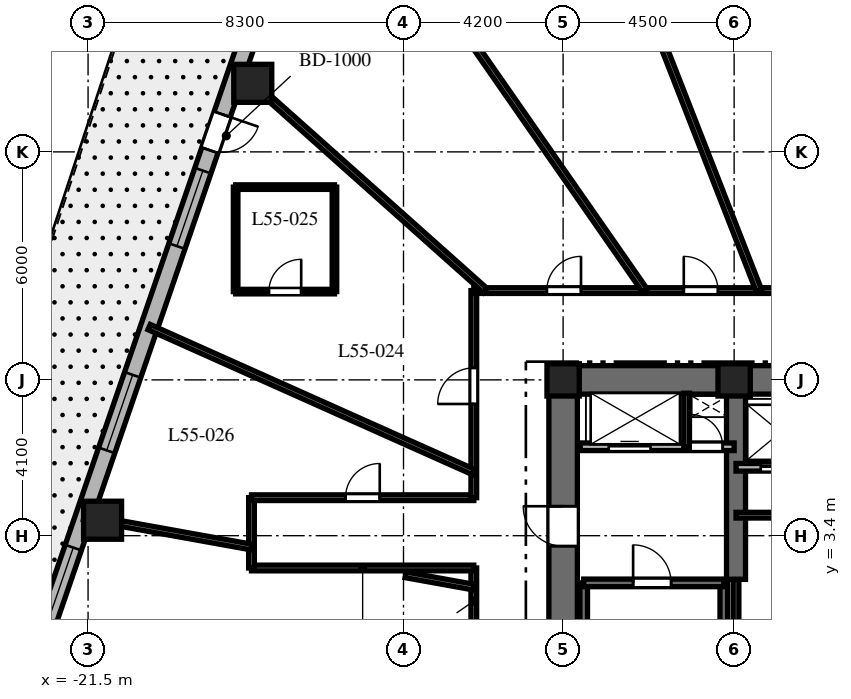
"""IFC4 building model, lengths in metres.
Left out: names, types, materials, properties, quantities, classifications, styles, units other than length and angle.
Written with IfcOpenShell. Run it as: python <this file> out.ifc"""

import sys

from ifc_helpers import new_model, si_unit, direction, frame, frame_2d, origin, origin_2d, place, context, subcontext, project, spatial, rectangle, extrude, element, fill, save


model = new_model("IFC4")
c1 = context("Model", 3, precision=1e-05, world=origin(), true_north=direction((0.0, 1.0)))
c2 = subcontext(c1, "Body", "Model", "MODEL_VIEW")
j1 = project(units=[si_unit("LENGTHUNIT", "METRE"), si_unit("PLANEANGLEUNIT", "RADIAN")], contexts=[c1])
p1 = place(None, origin())
s1 = spatial("IfcSite", under=j1, at=p1, CompositionType="ELEMENT")
p2 = place(p1, origin())
s2 = spatial("IfcBuilding", under=s1, at=p2, CompositionType="ELEMENT")
p3 = place(p2, frame((0.0, 0.0, 221.7)))
s3 = spatial("IfcBuildingStorey", under=s2, at=p3, CompositionType="ELEMENT", Elevation=221.7)
p4 = place(p3, frame((-9.375, 7.5, 0.0), z_axis=(0.0, 0.0, 1.0), x_axis=(1.0, 0.0, 0.0)))
e1 = element("IfcWall", 1, at=p4, inside=s3, PredefinedType="SHEAR", context=c2, shape_type="SweptSolid", body=[
    extrude(rectangle(XDim=9.425, YDim=0.75, at=frame_2d((4.712, 0.0))), origin(), (0.0, 0.0, 1.0), 3.8),
])
p5 = place(p3, frame((-9.0, -7.125, 0.0), z_axis=(0.0, 0.0, 1.0), x_axis=(0.0, 1.0, 0.0)))
e2 = element("IfcWall", 2, at=p5, inside=s3, PredefinedType="SHEAR", context=c2, shape_type="SweptSolid", body=[
    extrude(rectangle(XDim=14.25, YDim=0.75, at=frame_2d((7.125, 0.0))), origin(), (0.0, 0.0, 1.0), 3.8),
])
p6 = place(p5, frame((10.25, 0.0, 0.0)))
e3 = element("IfcOpeningElement", 3, at=p6, cuts=e2, PredefinedType="OPENING", context=c2, shape_type="SweptSolid", body=[
    extrude(rectangle(XDim=1.05, YDim=2.15, at=frame_2d((0.525, 1.075))), frame((0.0, 0.385, 0.0), z_axis=(0.0, -1.0, 0.0), x_axis=(1.0, 0.0, 0.0)), (0.0, 0.0, 1.0), 0.77),
])
p7 = place(p3, frame((-4.45, 2.25, 0.0), z_axis=(0.0, 0.0, 1.0), x_axis=(0.0, 1.0, 0.0)))
e4 = element("IfcWall", 4, at=p7, inside=s3, PredefinedType="SHEAR", context=c2, shape_type="SweptSolid", body=[
    extrude(rectangle(XDim=4.875, YDim=0.5, at=frame_2d((2.438, 0.0))), origin(), (0.0, 0.0, 1.0), 3.8),
])
for number, where, z_axis, x_axis in (
    (5, (-8.458, -6.985, 0.0), (0.0, 0.0, 1.0), (0.0, 1.0, 0.0)),
    (6, (-4.772, -6.985, 0.0), (0.0, 0.0, 1.0), (0.0, 1.0, 0.0)),
):
    element("IfcWall", number, at=place(p3, frame(where, z_axis=z_axis, x_axis=x_axis)), inside=s3, PredefinedType="SHEAR", context=c2, shape_type="SweptSolid", body=[
        extrude(rectangle(XDim=9.143, YDim=0.2, at=frame_2d((4.572, 0.0))), origin(), (0.0, 0.0, 1.0), 3.8),
    ])
p8 = place(p3, frame((-8.458, 2.158, 0.0), z_axis=(0.0, 0.0, 1.0), x_axis=(1.0, 0.0, 0.0)))
e7 = element("IfcWall", 7, at=p8, inside=s3, PredefinedType="SHEAR", context=c2, shape_type="SweptSolid", body=[
    extrude(rectangle(XDim=3.686, YDim=0.2, at=frame_2d((1.843, 0.0))), origin(), (0.0, 0.0, 1.0), 3.8),
])
p9 = place(p8, frame((1.3, 0.0, 0.0)))
e8 = element("IfcOpeningElement", 8, at=p9, cuts=e7, PredefinedType="OPENING", context=c2, shape_type="SweptSolid", body=[
    extrude(rectangle(XDim=1.0, YDim=2.15, at=frame_2d((0.5, 1.075))), frame((0.0, 0.11, 0.0), z_axis=(0.0, -1.0, 0.0), x_axis=(1.0, 0.0, 0.0)), (0.0, 0.0, 1.0), 0.22),
])
for number, where, z_axis, x_axis in (
    (9, (-4.5, 7.5, 0.0), (0.0, 0.0, 1.0), (1.0, 0.0, 0.0)),
    (10, (-9.0, 7.5, 0.0), (0.0, 0.0, 1.0), (1.0, 0.0, 0.0)),
):
    element("IfcColumn", number, at=place(p3, frame(where, z_axis=z_axis, x_axis=x_axis)), inside=s3, PredefinedType="COLUMN", context=c2, shape_type="SweptSolid", body=[
        extrude(rectangle(XDim=0.85, YDim=0.85, at=origin_2d()), origin(), (0.0, 0.0, 1.0), 3.8),
    ])
for number, where, z_axis, x_axis in (
    (11, (-17.166, 15.304, 0.0), (0.0, 0.0, 1.0), (1.0, 0.0, 0.0)),
    (12, (-21.118, 3.807, 0.0), (0.0, 0.0, 1.0), (1.0, 0.0, 0.0)),
):
    element("IfcColumn", number, at=place(p3, frame(where, z_axis=z_axis, x_axis=x_axis)), inside=s3, PredefinedType="COLUMN", context=c2, shape_type="SweptSolid", body=[
        extrude(rectangle(XDim=1.0, YDim=1.0, at=origin_2d()), origin(), (0.0, 0.0, 1.0), 3.8),
    ])
p10 = place(p3, frame((-16.324, 19.275, 0.0), z_axis=(0.0, 0.0, 1.0), x_axis=(-0.325083142304, -0.945685439557, 0.0)))
e13 = element("IfcWall", 13, at=p10, inside=s3, PredefinedType="SOLIDWALL", context=c2, shape_type="SweptSolid", body=[
    extrude(rectangle(XDim=20.224, YDim=0.45, at=frame_2d((10.112, 0.0))), origin(), (0.0, 0.0, 1.0), 3.5),
])
p11 = place(p10, frame((5.062, 0.0, 0.0)))
e14 = element("IfcOpeningElement", 14, at=p11, cuts=e13, PredefinedType="OPENING", context=c2, shape_type="SweptSolid", body=[
    extrude(rectangle(XDim=1.0, YDim=2.15, at=frame_2d((0.5, 1.075))), frame((0.0, 0.235, 0.0), z_axis=(0.0, -1.0, 0.0), x_axis=(1.0, 0.0, 0.0)), (0.0, 0.0, 1.0), 0.47),
])
p12 = place(p10, frame((0.953, 0.0, 0.8)))
e15 = element("IfcOpeningElement", 15, at=p12, cuts=e13, PredefinedType="OPENING", context=c2, shape_type="SweptSolid", body=[
    extrude(rectangle(XDim=2.1, YDim=1.85, at=frame_2d((1.05, 0.925))), frame((0.0, 0.235, 0.0), z_axis=(0.0, -1.0, 0.0), x_axis=(1.0, 0.0, 0.0)), (0.0, 0.0, 1.0), 0.47),
])
p13 = place(p10, frame((6.629, 0.0, 0.8)))
e16 = element("IfcOpeningElement", 16, at=p13, cuts=e13, PredefinedType="OPENING", context=c2, shape_type="SweptSolid", body=[
    extrude(rectangle(XDim=2.1, YDim=1.85, at=frame_2d((1.05, 0.925))), frame((0.0, 0.235, 0.0), z_axis=(0.0, -1.0, 0.0), x_axis=(1.0, 0.0, 0.0)), (0.0, 0.0, 1.0), 0.47),
])
p14 = place(p10, frame((12.312, 0.0, 0.8)))
e17 = element("IfcOpeningElement", 17, at=p14, cuts=e13, PredefinedType="OPENING", context=c2, shape_type="SweptSolid", body=[
    extrude(rectangle(XDim=2.1, YDim=1.85, at=frame_2d((1.05, 0.925))), frame((0.0, 0.235, 0.0), z_axis=(0.0, -1.0, 0.0), x_axis=(1.0, 0.0, 0.0)), (0.0, 0.0, 1.0), 0.47),
])
p15 = place(p10, frame((17.118, 0.0, 0.8)))
e18 = element("IfcOpeningElement", 18, at=p15, cuts=e13, PredefinedType="OPENING", context=c2, shape_type="SweptSolid", body=[
    extrude(rectangle(XDim=2.1, YDim=1.85, at=frame_2d((1.05, 0.925))), frame((0.0, 0.235, 0.0), z_axis=(0.0, -1.0, 0.0), x_axis=(1.0, 0.0, 0.0)), (0.0, 0.0, 1.0), 0.47),
])
p16 = place(p3, frame((-8.55, 5.74, 0.0), z_axis=(0.0, 0.0, 1.0), x_axis=(1.0, 0.0, 0.0)))
e19 = element("IfcWall", 19, at=p16, inside=s3, PredefinedType="PARTITIONING", context=c2, shape_type="SweptSolid", body=[
    extrude(rectangle(XDim=4.05, YDim=0.2, at=frame_2d((2.025, 0.0))), origin(), (0.0, 0.0, 1.0), 3.5),
])
p17 = place(p16, frame((0.75, 0.0, 0.0)))
e20 = element("IfcOpeningElement", 20, at=p17, cuts=e19, PredefinedType="OPENING", context=c2, shape_type="SweptSolid", body=[
    extrude(rectangle(XDim=1.1, YDim=2.2, at=frame_2d((0.55, 1.1))), frame((0.0, 0.11, 0.0), z_axis=(0.0, -1.0, 0.0), x_axis=(1.0, 0.0, 0.0)), (0.0, 0.0, 1.0), 0.22),
])
p18 = place(p16, frame((2.9, 0.0, 0.0)))
e21 = element("IfcOpeningElement", 21, at=p18, cuts=e19, PredefinedType="OPENING", context=c2, shape_type="SweptSolid", body=[
    extrude(rectangle(XDim=0.85, YDim=2.03, at=frame_2d((0.425, 1.015))), frame((0.0, 0.11, 0.0), z_axis=(0.0, -1.0, 0.0), x_axis=(1.0, 0.0, 0.0)), (0.0, 0.0, 1.0), 0.22),
])
p19 = place(p3, frame((-5.75, 5.74, 0.0), z_axis=(0.0, 0.0, 1.0), x_axis=(0.0, 1.0, 0.0)))
e22 = element("IfcWall", 22, at=p19, inside=s3, PredefinedType="PARTITIONING", context=c2, shape_type="SweptSolid", body=[
    extrude(rectangle(XDim=1.41, YDim=0.15, at=frame_2d((0.705, 0.0))), origin(), (0.0, 0.0, 1.0), 3.5),
])
p20 = place(p3, frame((-4.45, 5.2, 0.0), z_axis=(0.0, 0.0, 1.0), x_axis=(1.0, 0.0, 0.0)))
e23 = element("IfcWall", 23, at=p20, inside=s3, PredefinedType="PARTITIONING", context=c2, shape_type="SweptSolid", body=[
    extrude(rectangle(XDim=4.5, YDim=0.2, at=frame_2d((2.25, 0.0))), origin(), (0.0, 0.0, 1.0), 3.5),
])
p21 = place(p20, frame((0.65, 0.0, 0.0)))
e24 = element("IfcOpeningElement", 24, at=p21, cuts=e23, PredefinedType="OPENING", context=c2, shape_type="SweptSolid", body=[
    extrude(rectangle(XDim=1.0, YDim=2.2, at=frame_2d((0.5, 1.1))), frame((0.0, 0.11, 0.0), z_axis=(0.0, -1.0, 0.0), x_axis=(1.0, 0.0, 0.0)), (0.0, 0.0, 1.0), 0.22),
])
p22 = place(p20, frame((2.85, 0.0, 0.0)))
e25 = element("IfcOpeningElement", 25, at=p22, cuts=e23, PredefinedType="OPENING", context=c2, shape_type="SweptSolid", body=[
    extrude(rectangle(XDim=1.0, YDim=2.2, at=frame_2d((0.5, 1.1))), frame((0.0, 0.11, 0.0), z_axis=(0.0, -1.0, 0.0), x_axis=(1.0, 0.0, 0.0)), (0.0, 0.0, 1.0), 0.22),
])
p23 = place(p3, frame((-4.45, -0.5, 0.0), z_axis=(0.0, 0.0, 1.0), x_axis=(0.0, 1.0, 0.0)))
e26 = element("IfcWall", 26, at=p23, inside=s3, PredefinedType="PARTITIONING", context=c2, shape_type="SweptSolid", body=[
    extrude(rectangle(XDim=2.75, YDim=0.15, at=frame_2d((1.375, 0.0))), origin(), (0.0, 0.0, 1.0), 3.5),
])
p24 = place(p3, frame((-4.45, 3.94, 0.0), z_axis=(0.0, 0.0, 1.0), x_axis=(1.0, 0.0, 0.0)))
e27 = element("IfcWall", 27, at=p24, inside=s3, PredefinedType="PARTITIONING", context=c2, shape_type="SweptSolid", body=[
    extrude(rectangle(XDim=2.55, YDim=0.15, at=frame_2d((1.275, 0.0))), origin(), (0.0, 0.0, 1.0), 3.5),
])
p25 = place(p3, frame((-11.35, -9.85, 0.0), z_axis=(0.0, 0.0, 1.0), x_axis=(0.0, 1.0, 0.0)))
e28 = element("IfcWall", 28, at=p25, inside=s3, PredefinedType="PARTITIONING", context=c2, shape_type="SweptSolid", body=[
    extrude(rectangle(XDim=12.4, YDim=0.15, at=frame_2d((6.2, 0.0))), origin(), (0.0, 0.0, 1.0), 2.99),
])
p26 = place(p25, frame((8.835, 0.0, 0.0)))
e29 = element("IfcOpeningElement", 29, at=p26, cuts=e28, PredefinedType="OPENING", context=c2, shape_type="SweptSolid", body=[
    extrude(rectangle(XDim=0.95, YDim=2.03, at=frame_2d((0.475, 1.015))), frame((0.0, 0.085, 0.0), z_axis=(0.0, -1.0, 0.0), x_axis=(1.0, 0.0, 0.0)), (0.0, 0.0, 1.0), 0.17),
])
p27 = place(p25, frame((4.443, 0.0, 0.0)))
e30 = element("IfcOpeningElement", 30, at=p27, cuts=e28, PredefinedType="OPENING", context=c2, shape_type="SweptSolid", body=[
    extrude(rectangle(XDim=0.95, YDim=2.03, at=frame_2d((0.475, 1.015))), frame((0.0, 0.085, 0.0), z_axis=(0.0, -1.0, 0.0), x_axis=(1.0, 0.0, 0.0)), (0.0, 0.0, 1.0), 0.17),
])
p28 = place(p25, frame((1.242, 0.0, 0.0)))
e31 = element("IfcOpeningElement", 31, at=p28, cuts=e28, PredefinedType="OPENING", context=c2, shape_type="SweptSolid", body=[
    extrude(rectangle(XDim=0.9, YDim=2.03, at=frame_2d((0.45, 1.015))), frame((0.0, 0.085, 0.0), z_axis=(0.0, -1.0, 0.0), x_axis=(1.0, 0.0, 0.0)), (0.0, 0.0, 1.0), 0.17),
])
p29 = place(p3, frame((-11.35, 2.55, 0.0), z_axis=(0.0, 0.0, 1.0), x_axis=(-1.0, 0.0, 0.0)))
e32 = element("IfcWall", 32, at=p29, inside=s3, PredefinedType="PARTITIONING", context=c2, shape_type="SweptSolid", body=[
    extrude(rectangle(XDim=5.85, YDim=0.15, at=frame_2d((2.925, 0.0))), origin(), (0.0, 0.0, 1.0), 2.94),
])
p30 = place(p3, frame((-17.2, 2.55, 0.0), z_axis=(0.0, 0.0, 1.0), x_axis=(0.0, 1.0, 0.0)))
e33 = element("IfcWall", 33, at=p30, inside=s3, PredefinedType="PARTITIONING", context=c2, shape_type="SweptSolid", body=[
    extrude(rectangle(XDim=1.85, YDim=0.15, at=frame_2d((0.925, 0.0))), origin(), (0.0, 0.0, 1.0), 2.94),
])
p31 = place(p3, frame((-17.2, 4.4, 0.0), z_axis=(0.0, 0.0, 1.0), x_axis=(1.0, 0.0, 0.0)))
e34 = element("IfcWall", 34, at=p31, inside=s3, PredefinedType="PARTITIONING", context=c2, shape_type="SweptSolid", body=[
    extrude(rectangle(XDim=5.85, YDim=0.15, at=frame_2d((2.925, 0.0))), origin(), (0.0, 0.0, 1.0), 2.94),
])
p32 = place(p31, frame((2.475, 0.0, 0.0)))
e35 = element("IfcOpeningElement", 35, at=p32, cuts=e34, PredefinedType="OPENING", context=c2, shape_type="SweptSolid", body=[
    extrude(rectangle(XDim=0.9, YDim=2.03, at=frame_2d((0.45, 1.015))), frame((0.0, 0.085, 0.0), z_axis=(0.0, -1.0, 0.0), x_axis=(1.0, 0.0, 0.0)), (0.0, 0.0, 1.0), 0.17),
])
p33 = place(p3, frame((-11.35, 4.4, 0.0), z_axis=(0.0, 0.0, 1.0), x_axis=(0.0, 1.0, 0.0)))
e36 = element("IfcWall", 36, at=p33, inside=s3, PredefinedType="PARTITIONING", context=c2, shape_type="SweptSolid", body=[
    extrude(rectangle(XDim=5.45, YDim=0.15, at=frame_2d((2.725, 0.0))), origin(), (0.0, 0.0, 1.0), 2.99),
])
p34 = place(p33, frame((2.466, 0.0, 0.0)))
e37 = element("IfcOpeningElement", 37, at=p34, cuts=e36, PredefinedType="OPENING", context=c2, shape_type="SweptSolid", body=[
    extrude(rectangle(XDim=0.95, YDim=2.03, at=frame_2d((0.475, 1.015))), frame((0.0, 0.085, 0.0), z_axis=(0.0, -1.0, 0.0), x_axis=(1.0, 0.0, 0.0)), (0.0, 0.0, 1.0), 0.17),
])
p35 = place(p3, frame((-11.35, 9.85, 0.0), z_axis=(0.0, 0.0, 1.0), x_axis=(1.0, 0.0, 0.0)))
e38 = element("IfcWall", 38, at=p35, inside=s3, PredefinedType="PARTITIONING", context=c2, shape_type="SweptSolid", body=[
    extrude(rectangle(XDim=10.43, YDim=0.15, at=frame_2d((5.215, 0.0))), origin(), (0.0, 0.0, 1.0), 2.99),
])
p36 = place(p35, frame((8.387, 0.0, 0.0)))
e39 = element("IfcOpeningElement", 39, at=p36, cuts=e38, PredefinedType="OPENING", context=c2, shape_type="SweptSolid", body=[
    extrude(rectangle(XDim=0.9, YDim=2.03, at=frame_2d((0.45, 1.015))), frame((0.0, 0.085, 0.0), z_axis=(0.0, -1.0, 0.0), x_axis=(1.0, 0.0, 0.0)), (0.0, 0.0, 1.0), 0.17),
])
p37 = place(p35, frame((5.525, 0.0, 0.0)))
e40 = element("IfcOpeningElement", 40, at=p37, cuts=e38, PredefinedType="OPENING", context=c2, shape_type="SweptSolid", body=[
    extrude(rectangle(XDim=0.9, YDim=2.03, at=frame_2d((0.45, 1.015))), frame((0.0, 0.085, 0.0), z_axis=(0.0, -1.0, 0.0), x_axis=(1.0, 0.0, 0.0)), (0.0, 0.0, 1.0), 0.17),
])
p38 = place(p35, frame((1.921, 0.0, 0.0)))
e41 = element("IfcOpeningElement", 41, at=p38, cuts=e38, PredefinedType="OPENING", context=c2, shape_type="SweptSolid", body=[
    extrude(rectangle(XDim=0.9, YDim=2.03, at=frame_2d((0.45, 1.015))), frame((0.0, 0.085, 0.0), z_axis=(0.0, -1.0, 0.0), x_axis=(1.0, 0.0, 0.0)), (0.0, 0.0, 1.0), 0.17),
])
p39 = place(p3, frame((-3.848, 9.85, 0.0), z_axis=(0.0, 0.0, 1.0), x_axis=(-0.363921778212, 0.931429513889, 0.0)))
e42 = element("IfcWall", 42, at=p39, inside=s3, PredefinedType="PARTITIONING", context=c2, shape_type="SweptSolid", body=[
    extrude(rectangle(XDim=12.588, YDim=0.15, at=frame_2d((6.294, 0.0))), origin(), (0.0, 0.0, 1.0), 2.74),
])
p40 = place(p3, frame((-6.849, 9.85, 0.0), z_axis=(0.0, 0.0, 1.0), x_axis=(-0.570871709026, 0.821039275451, 0.0)))
e43 = element("IfcWall", 43, at=p40, inside=s3, PredefinedType="PARTITIONING", context=c2, shape_type="SweptSolid", body=[
    extrude(rectangle(XDim=13.582, YDim=0.15, at=frame_2d((6.791, 0.0))), origin(), (0.0, 0.0, 1.0), 2.74),
])
p41 = place(p3, frame((-11.048, 9.85, 0.0), z_axis=(0.0, 0.0, 1.0), x_axis=(-0.746444434655, 0.665447748492, 0.0)))
e44 = element("IfcWall", 44, at=p41, inside=s3, PredefinedType="PARTITIONING", context=c2, shape_type="SweptSolid", body=[
    extrude(rectangle(XDim=8.732, YDim=0.15, at=frame_2d((4.366, 0.0))), origin(), (0.0, 0.0, 1.0), 2.74),
])
p42 = place(p3, frame((-11.35, 5.072, 0.0), z_axis=(0.0, 0.0, 1.0), x_axis=(-0.912980177983, 0.408003914944, 0.0)))
e45 = element("IfcWall", 45, at=p42, inside=s3, PredefinedType="PARTITIONING", context=c2, shape_type="SweptSolid", body=[
    extrude(rectangle(XDim=9.358, YDim=0.15, at=frame_2d((4.679, 0.0))), origin(), (0.0, 0.0, 1.0), 2.74),
])
p43 = place(p3, frame((-11.35, 2.046, 0.0), z_axis=(0.0, 0.0, 1.0), x_axis=(-0.984127783205, 0.177461281195, 0.0)))
e46 = element("IfcWall", 46, at=p43, inside=s3, PredefinedType="PARTITIONING", context=c2, shape_type="SweptSolid", body=[
    extrude(rectangle(XDim=1.826, YDim=0.15, at=frame_2d((0.913, 0.0))), origin(), (0.0, 0.0, 1.0), 3.5),
])
p44 = place(p3, frame((-17.2, 3.101, 0.0), z_axis=(0.0, 0.0, 1.0), x_axis=(-0.98413465883, 0.177423147559, 0.0)))
e47 = element("IfcWall", 47, at=p44, inside=s3, PredefinedType="PARTITIONING", context=c2, shape_type="SweptSolid", body=[
    extrude(rectangle(XDim=4.482, YDim=0.15, at=frame_2d((2.241, 0.0))), origin(), (0.0, 0.0, 1.0), 2.74),
])
p45 = place(p3, frame((-17.617, 9.823, 0.0), z_axis=(0.0, 0.0, 1.0), x_axis=(1.0, 0.0, 0.0)))
e48 = element("IfcWall", 48, at=p45, inside=s3, PredefinedType="PARTITIONING", context=c2, shape_type="SweptSolid", body=[
    extrude(rectangle(XDim=2.6, YDim=0.12, at=frame_2d((1.3, 0.0))), origin(), (0.0, 0.0, 1.0), 3.073),
])
p46 = place(p45, frame((0.875, 0.0, 0.0)))
e49 = element("IfcOpeningElement", 49, at=p46, cuts=e48, PredefinedType="OPENING", context=c2, shape_type="SweptSolid", body=[
    extrude(rectangle(XDim=0.85, YDim=2.03, at=frame_2d((0.425, 1.015))), frame((0.0, 0.07, 0.0), z_axis=(0.0, -1.0, 0.0), x_axis=(1.0, 0.0, 0.0)), (0.0, 0.0, 1.0), 0.14),
])
p47 = place(p3, frame((-15.017, 9.823, 0.0), z_axis=(0.0, 0.0, 1.0), x_axis=(0.0, 1.0, 0.0)))
e50 = element("IfcWall", 50, at=p47, inside=s3, PredefinedType="PARTITIONING", context=c2, shape_type="SweptSolid", body=[
    extrude(rectangle(XDim=2.75, YDim=0.12, at=frame_2d((1.375, 0.0))), origin(), (0.0, 0.0, 1.0), 3.073),
])
p48 = place(p3, frame((-15.017, 12.573, 0.0), z_axis=(0.0, 0.0, 1.0), x_axis=(-1.0, 0.0, 0.0)))
e51 = element("IfcWall", 51, at=p48, inside=s3, PredefinedType="PARTITIONING", context=c2, shape_type="SweptSolid", body=[
    extrude(rectangle(XDim=2.6, YDim=0.12, at=frame_2d((1.3, 0.0))), origin(), (0.0, 0.0, 1.0), 3.5),
])
p49 = place(p3, frame((-17.617, 12.573, 0.0), z_axis=(0.0, 0.0, 1.0), x_axis=(0.0, -1.0, 0.0)))
e52 = element("IfcWall", 52, at=p49, inside=s3, PredefinedType="PARTITIONING", context=c2, shape_type="SweptSolid", body=[
    extrude(rectangle(XDim=2.75, YDim=0.12, at=frame_2d((1.375, 0.0))), origin(), (0.0, 0.0, 1.0), 3.5),
])
p50 = place(p11, origin())
e53 = element("IfcDoor", 53, at=p50, inside=s3, OperationType="SINGLE_SWING_LEFT", PredefinedType="DOOR", context=c2, shape_type="SweptSolid", body=[
    extrude(rectangle(XDim=1.0, YDim=2.15, at=frame_2d((0.5, 1.075))), frame((0.0, 0.025, 0.0), z_axis=(0.0, -1.0, 0.0), x_axis=(1.0, 0.0, 0.0)), (0.0, 0.0, 1.0), 0.05),
])
fill(e14, e53)
p51 = place(p13, origin())
e54 = element("IfcWindow", 54, at=p51, inside=s3, PartitioningType="SINGLE_PANEL", PredefinedType="WINDOW", context=c2, shape_type="SweptSolid", body=[
    extrude(rectangle(XDim=2.1, YDim=1.85, at=frame_2d((1.05, 0.925))), frame((0.0, 0.03, 0.0), z_axis=(0.0, -1.0, 0.0), x_axis=(1.0, 0.0, 0.0)), (0.0, 0.0, 1.0), 0.06),
])
fill(e16, e54)
p52 = place(p14, origin())
e55 = element("IfcWindow", 55, at=p52, inside=s3, PartitioningType="SINGLE_PANEL", PredefinedType="WINDOW", context=c2, shape_type="SweptSolid", body=[
    extrude(rectangle(XDim=2.1, YDim=1.85, at=frame_2d((1.05, 0.925))), frame((0.0, 0.03, 0.0), z_axis=(0.0, -1.0, 0.0), x_axis=(1.0, 0.0, 0.0)), (0.0, 0.0, 1.0), 0.06),
])
fill(e17, e55)
p53 = place(p15, origin())
e56 = element("IfcWindow", 56, at=p53, inside=s3, PartitioningType="SINGLE_PANEL", PredefinedType="WINDOW", context=c2, shape_type="SweptSolid", body=[
    extrude(rectangle(XDim=2.1, YDim=1.85, at=frame_2d((1.05, 0.925))), frame((0.0, 0.03, 0.0), z_axis=(0.0, -1.0, 0.0), x_axis=(1.0, 0.0, 0.0)), (0.0, 0.0, 1.0), 0.06),
])
fill(e18, e56)
p54 = place(p9, origin())
e57 = element("IfcDoor", 57, at=p54, inside=s3, OperationType="SINGLE_SWING_LEFT", PredefinedType="DOOR", context=c2, shape_type="SweptSolid", body=[
    extrude(rectangle(XDim=1.0, YDim=2.15, at=frame_2d((0.5, 1.075))), frame((0.0, 0.025, 0.0), z_axis=(0.0, -1.0, 0.0), x_axis=(1.0, 0.0, 0.0)), (0.0, 0.0, 1.0), 0.05),
])
fill(e8, e57)
p55 = place(p6, origin())
e58 = element("IfcDoor", 58, at=p55, inside=s3, OperationType="SINGLE_SWING_RIGHT", PredefinedType="DOOR", context=c2, shape_type="SweptSolid", body=[
    extrude(rectangle(XDim=1.05, YDim=2.15, at=frame_2d((0.525, 1.075))), frame((0.0, 0.025, 0.0), z_axis=(0.0, -1.0, 0.0), x_axis=(1.0, 0.0, 0.0)), (0.0, 0.0, 1.0), 0.05),
])
fill(e3, e58)
p56 = place(p17, origin())
e59 = element("IfcDoor", 59, at=p56, inside=s3, OperationType="SLIDING_TO_LEFT", PredefinedType="DOOR", context=c2, shape_type="SweptSolid", body=[
    extrude(rectangle(XDim=1.1, YDim=2.2, at=frame_2d((0.55, 1.1))), frame((0.0, 0.025, 0.0), z_axis=(0.0, -1.0, 0.0), x_axis=(1.0, 0.0, 0.0)), (0.0, 0.0, 1.0), 0.05),
])
fill(e20, e59)
p57 = place(p18, origin())
e60 = element("IfcDoor", 60, at=p57, inside=s3, OperationType="SINGLE_SWING_LEFT", PredefinedType="DOOR", context=c2, shape_type="SweptSolid", body=[
    extrude(rectangle(XDim=0.85, YDim=2.03, at=frame_2d((0.425, 1.015))), frame((0.0, 0.025, 0.0), z_axis=(0.0, -1.0, 0.0), x_axis=(1.0, 0.0, 0.0)), (0.0, 0.0, 1.0), 0.05),
])
fill(e21, e60)
p58 = place(p21, origin())
e61 = element("IfcDoor", 61, at=p58, inside=s3, OperationType="SLIDING_TO_LEFT", PredefinedType="DOOR", context=c2, shape_type="SweptSolid", body=[
    extrude(rectangle(XDim=1.0, YDim=2.2, at=frame_2d((0.5, 1.1))), frame((0.0, 0.025, 0.0), z_axis=(0.0, -1.0, 0.0), x_axis=(1.0, 0.0, 0.0)), (0.0, 0.0, 1.0), 0.05),
])
fill(e24, e61)
p59 = place(p37, origin())
e62 = element("IfcDoor", 62, at=p59, inside=s3, OperationType="SINGLE_SWING_LEFT", PredefinedType="DOOR", context=c2, shape_type="SweptSolid", body=[
    extrude(rectangle(XDim=0.9, YDim=2.03, at=frame_2d((0.45, 1.015))), frame((0.0, 0.025, 0.0), z_axis=(0.0, -1.0, 0.0), x_axis=(1.0, 0.0, 0.0)), (0.0, 0.0, 1.0), 0.05),
])
fill(e40, e62)
p60 = place(p38, origin())
e63 = element("IfcDoor", 63, at=p60, inside=s3, OperationType="SINGLE_SWING_RIGHT", PredefinedType="DOOR", context=c2, shape_type="SweptSolid", body=[
    extrude(rectangle(XDim=0.9, YDim=2.03, at=frame_2d((0.45, 1.015))), frame((0.0, 0.025, 0.0), z_axis=(0.0, -1.0, 0.0), x_axis=(1.0, 0.0, 0.0)), (0.0, 0.0, 1.0), 0.05),
])
fill(e41, e63)
p61 = place(p34, origin())
e64 = element("IfcDoor", 64, at=p61, inside=s3, OperationType="SINGLE_SWING_LEFT", PredefinedType="DOOR", context=c2, shape_type="SweptSolid", body=[
    extrude(rectangle(XDim=0.95, YDim=2.03, at=frame_2d((0.475, 1.015))), frame((0.0, 0.025, 0.0), z_axis=(0.0, -1.0, 0.0), x_axis=(1.0, 0.0, 0.0)), (0.0, 0.0, 1.0), 0.05),
])
fill(e37, e64)
p62 = place(p46, origin())
e65 = element("IfcDoor", 65, at=p62, inside=s3, OperationType="SINGLE_SWING_RIGHT", PredefinedType="DOOR", context=c2, shape_type="SweptSolid", body=[
    extrude(rectangle(XDim=0.85, YDim=2.03, at=frame_2d((0.425, 1.015))), frame((0.0, 0.025, 0.0), z_axis=(0.0, -1.0, 0.0), x_axis=(1.0, 0.0, 0.0)), (0.0, 0.0, 1.0), 0.05),
])
fill(e49, e65)
p63 = place(p32, origin())
e66 = element("IfcDoor", 66, at=p63, inside=s3, OperationType="SINGLE_SWING_RIGHT", PredefinedType="DOOR", context=c2, shape_type="SweptSolid", body=[
    extrude(rectangle(XDim=0.9, YDim=2.03, at=frame_2d((0.45, 1.015))), frame((0.0, 0.025, 0.0), z_axis=(0.0, -1.0, 0.0), x_axis=(1.0, 0.0, 0.0)), (0.0, 0.0, 1.0), 0.05),
])
fill(e35, e66)
save(model, sys.argv[1])
